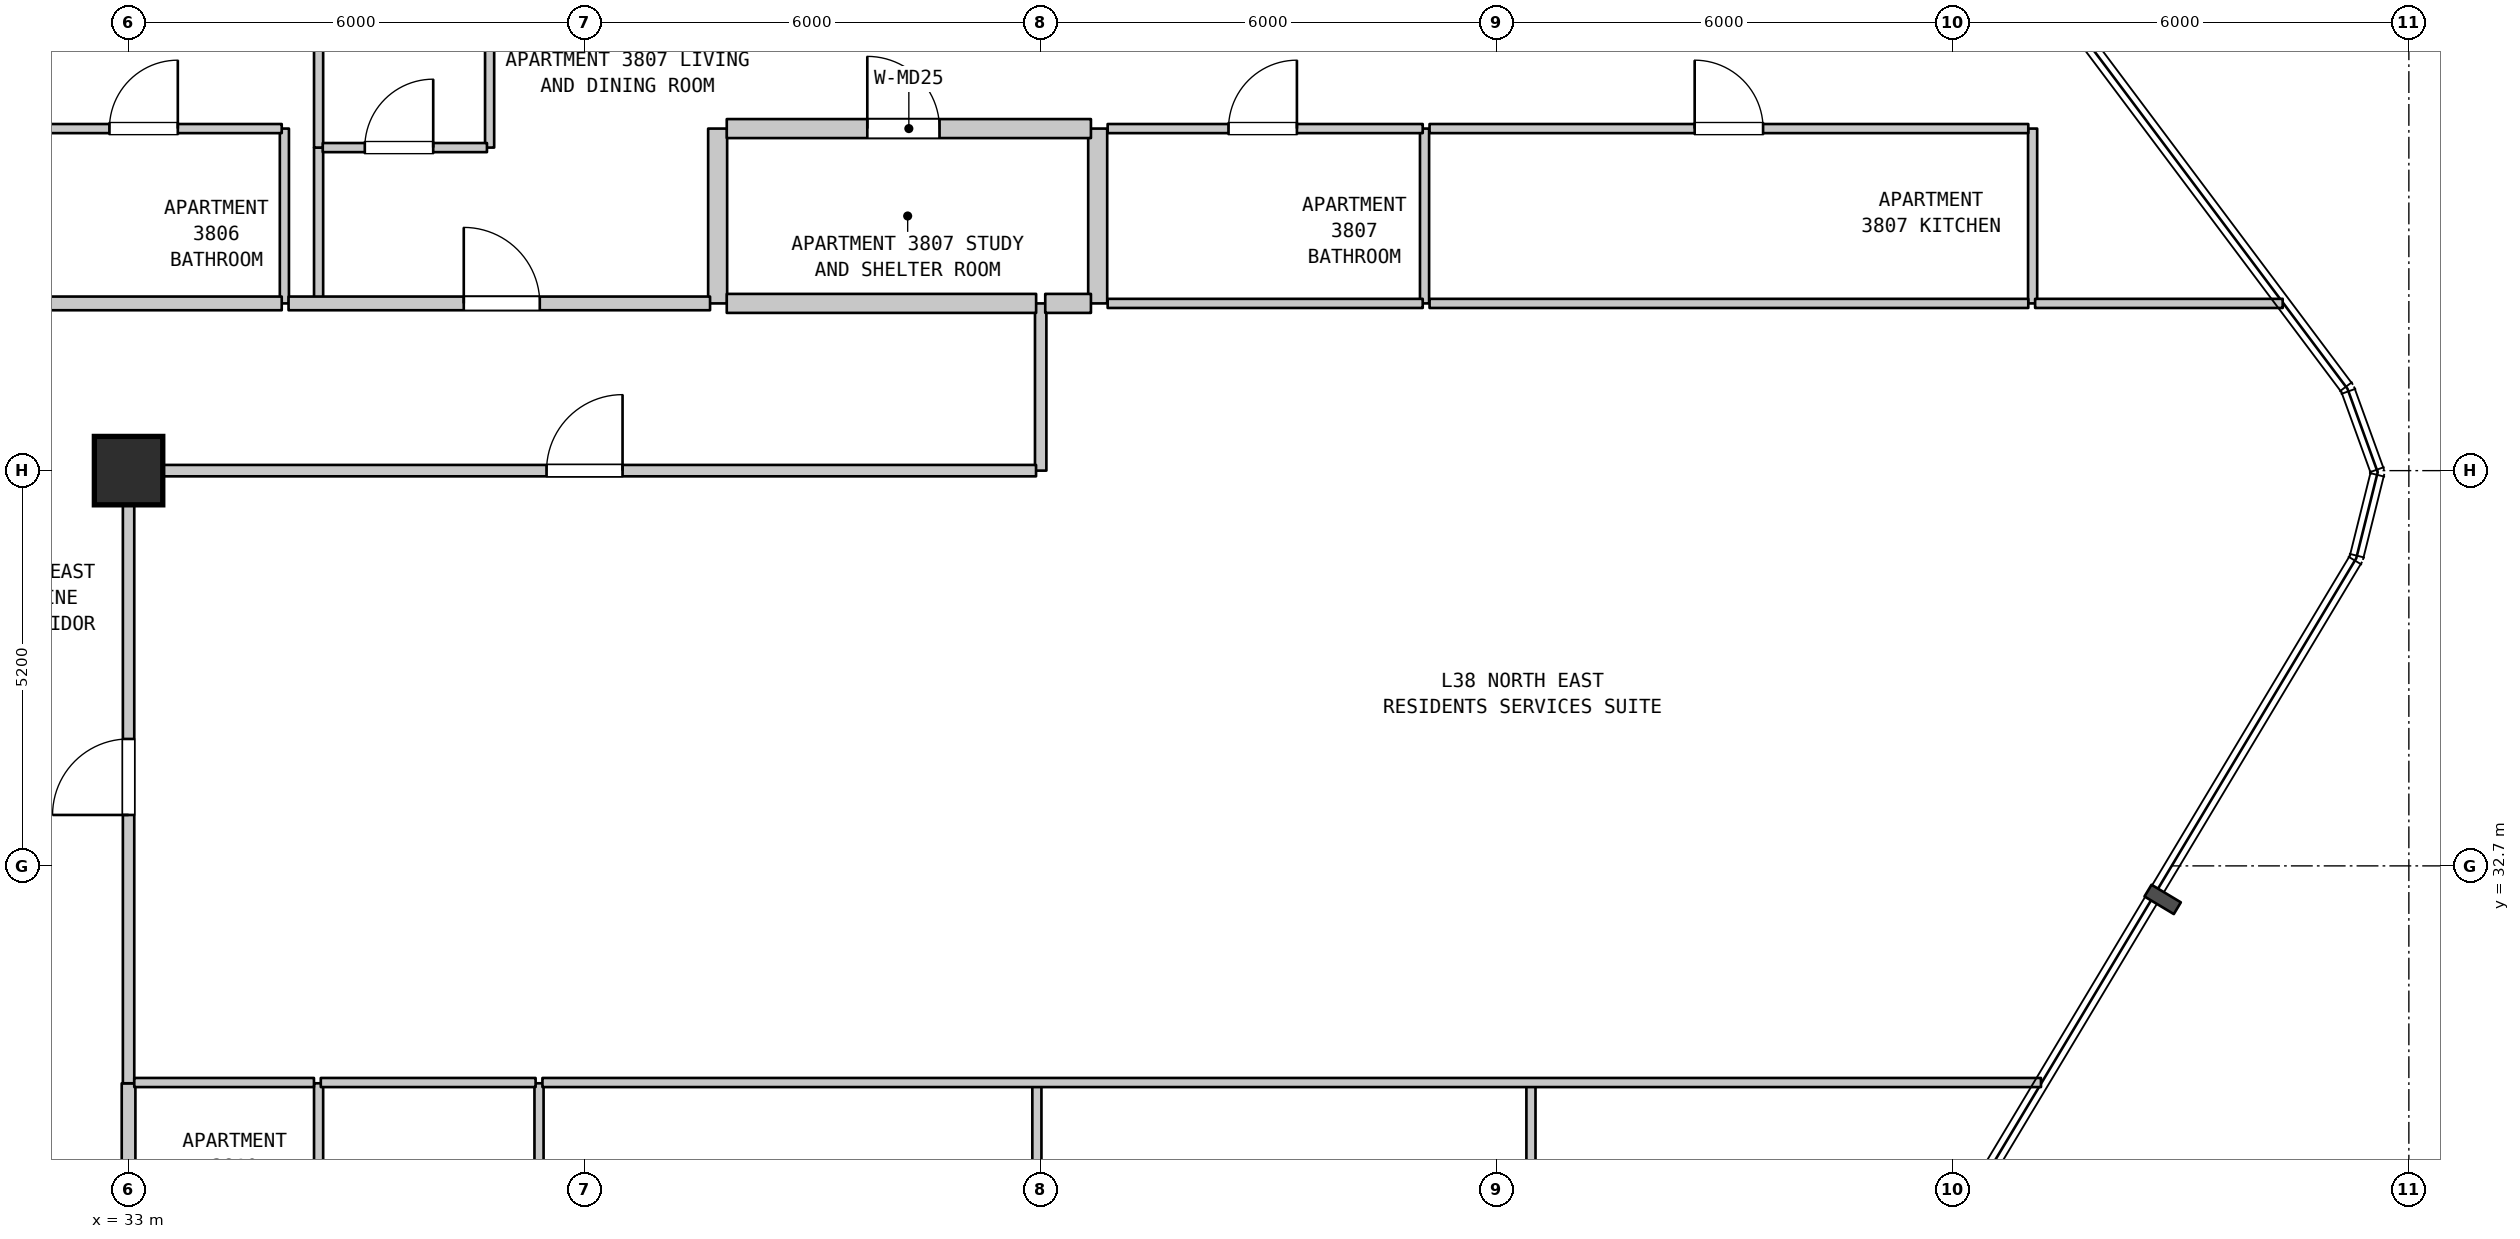
"""IFC4 building model, lengths in metres.
Left out: names, types, materials, properties, quantities, classifications, styles, units other than length and angle.
Written with IfcOpenShell. Run it as: python <this file> out.ifc"""

import sys

from ifc_helpers import new_model, si_unit, direction, frame, frame_2d, origin, origin_2d, place, context, subcontext, project, spatial, rectangle, extrude, element, fill, save


model = new_model("IFC4")
c1 = context("Model", 3, precision=1e-05, world=origin(), true_north=direction((0.0, 1.0)))
c2 = subcontext(c1, "Body", "Model", "MODEL_VIEW")
j1 = project(units=[si_unit("LENGTHUNIT", "METRE"), si_unit("PLANEANGLEUNIT", "RADIAN")], contexts=[c1])
p1 = place(None, origin())
s1 = spatial("IfcSite", under=j1, at=p1, CompositionType="ELEMENT")
p2 = place(p1, origin())
s2 = spatial("IfcBuilding", under=s1, at=p2, CompositionType="ELEMENT")
p3 = place(p2, frame((0.0, 0.0, 155.7)))
s3 = spatial("IfcBuildingStorey", under=s2, at=p3, CompositionType="ELEMENT", Elevation=155.7)
p4 = place(p3, frame((33.0, 37.9, 0.0), z_axis=(0.0, 0.0, 1.0), x_axis=(1.0, 0.0, 0.0)))
e1 = element("IfcColumn", 1, at=p4, inside=s3, PredefinedType="COLUMN", context=c2, shape_type="SweptSolid", body=[
    extrude(rectangle(XDim=0.9, YDim=0.9, at=origin_2d()), origin(), (0.0, 0.0, 1.0), 3.7),
])
p5 = place(p3, frame((33.0, 26.12, 0.0), z_axis=(0.0, 0.0, 1.0), x_axis=(0.0, 1.0, 0.0)))
e2 = element("IfcWall", 2, at=p5, inside=s3, PredefinedType="STANDARD", context=c2, shape_type="SweptSolid", body=[
    extrude(rectangle(XDim=3.72, YDim=0.18, at=frame_2d((1.86, 0.0))), origin(), (0.0, 0.0, 1.0), 2.78),
])
p6 = place(p3, frame((33.0, 29.84, 0.0), z_axis=(0.0, 0.0, 1.0), x_axis=(0.0, 1.0, 0.0)))
e3 = element("IfcWall", 3, at=p6, inside=s3, PredefinedType="STANDARD", context=c2, shape_type="SweptSolid", body=[
    extrude(rectangle(XDim=8.06, YDim=0.15, at=frame_2d((4.03, 0.0))), origin(), (0.0, 0.0, 1.0), 2.78),
])
p7 = place(p6, frame((3.53, 0.0, 0.0)))
e4 = element("IfcOpeningElement", 4, at=p7, cuts=e3, PredefinedType="OPENING", context=c2, shape_type="SweptSolid", body=[
    extrude(rectangle(XDim=1.0, YDim=2.15, at=frame_2d((0.5, 1.075))), frame((0.0, 0.085, 0.0), z_axis=(0.0, -1.0, 0.0), x_axis=(1.0, 0.0, 0.0)), (0.0, 0.0, 1.0), 0.17),
])
p8 = place(p3, frame((35.05, 40.1, 0.0), z_axis=(0.0, 0.0, 1.0), x_axis=(0.0, 1.0, 0.0)))
e5 = element("IfcWall", 5, at=p8, inside=s3, PredefinedType="PARTITIONING", context=c2, shape_type="SweptSolid", body=[
    extrude(rectangle(XDim=2.3, YDim=0.12, at=frame_2d((1.15, 0.0))), origin(), (0.0, 0.0, 1.0), 3.28),
])
p9 = place(p3, frame((35.5, 26.12, 0.0), z_axis=(0.0, 0.0, 1.0), x_axis=(0.0, 1.0, 0.0)))
e6 = element("IfcWall", 6, at=p9, inside=s3, PredefinedType="PARTITIONING", context=c2, shape_type="SweptSolid", body=[
    extrude(rectangle(XDim=3.72, YDim=0.12, at=frame_2d((1.86, 0.0))), origin(), (0.0, 0.0, 1.0), 3.28),
])
p10 = place(p3, frame((35.5, 40.1, 0.0), z_axis=(0.0, 0.0, 1.0), x_axis=(0.0, 1.0, 0.0)))
e7 = element("IfcWall", 7, at=p10, inside=s3, PredefinedType="PARTITIONING", context=c2, shape_type="SweptSolid", body=[
    extrude(rectangle(XDim=2.05, YDim=0.12, at=frame_2d((1.025, 0.0))), origin(), (0.0, 0.0, 1.0), 3.28),
])
p11 = place(p3, frame((35.5, 42.15, 0.0), z_axis=(0.0, 0.0, 1.0), x_axis=(0.0, 1.0, 0.0)))
e8 = element("IfcWall", 8, at=p11, inside=s3, PredefinedType="PARTITIONING", context=c2, shape_type="SweptSolid", body=[
    extrude(rectangle(XDim=3.3, YDim=0.12, at=frame_2d((1.65, 0.0))), origin(), (0.0, 0.0, 1.0), 3.28),
])
p12 = place(p3, frame((37.75, 42.15, 0.0), z_axis=(0.0, 0.0, 1.0), x_axis=(0.0, 1.0, 0.0)))
e9 = element("IfcWall", 9, at=p12, inside=s3, PredefinedType="PARTITIONING", context=c2, shape_type="SweptSolid", body=[
    extrude(rectangle(XDim=3.15, YDim=0.12, at=frame_2d((1.575, 0.0))), origin(), (0.0, 0.0, 1.0), 3.28),
])
p13 = place(p3, frame((38.4, 26.12, 0.0), z_axis=(0.0, 0.0, 1.0), x_axis=(0.0, 1.0, 0.0)))
e10 = element("IfcWall", 10, at=p13, inside=s3, PredefinedType="PARTITIONING", context=c2, shape_type="SweptSolid", body=[
    extrude(rectangle(XDim=3.72, YDim=0.12, at=frame_2d((1.86, 0.0))), origin(), (0.0, 0.0, 1.0), 3.28),
])
p14 = place(p3, frame((40.75, 40.1, 0.0), z_axis=(0.0, 0.0, 1.0), x_axis=(0.0, 1.0, 0.0)))
e11 = element("IfcWall", 11, at=p14, inside=s3, PredefinedType="STANDARD", context=c2, shape_type="SweptSolid", body=[
    extrude(rectangle(XDim=2.3, YDim=0.25, at=frame_2d((1.15, 0.0))), origin(), (0.0, 0.0, 1.0), 3.28),
])
p15 = place(p3, frame((44.95, 26.12, 0.0), z_axis=(0.0, 0.0, 1.0), x_axis=(0.0, 1.0, 0.0)))
e12 = element("IfcWall", 12, at=p15, inside=s3, PredefinedType="PARTITIONING", context=c2, shape_type="SweptSolid", body=[
    extrude(rectangle(XDim=3.72, YDim=0.12, at=frame_2d((1.86, 0.0))), origin(), (0.0, 0.0, 1.0), 3.28),
])
p16 = place(p3, frame((45.0, 37.9, 0.0), z_axis=(0.0, 0.0, 1.0), x_axis=(0.0, 1.0, 0.0)))
e13 = element("IfcWall", 13, at=p16, inside=s3, PredefinedType="STANDARD", context=c2, shape_type="SweptSolid", body=[
    extrude(rectangle(XDim=2.2, YDim=0.15, at=frame_2d((1.1, 0.0))), origin(), (0.0, 0.0, 1.0), 3.28),
])
p17 = place(p3, frame((45.75, 40.1, 0.0), z_axis=(0.0, 0.0, 1.0), x_axis=(0.0, 1.0, 0.0)))
e14 = element("IfcWall", 14, at=p17, inside=s3, PredefinedType="STANDARD", context=c2, shape_type="SweptSolid", body=[
    extrude(rectangle(XDim=2.3, YDim=0.25, at=frame_2d((1.15, 0.0))), origin(), (0.0, 0.0, 1.0), 3.28),
])
p18 = place(p3, frame((50.05, 40.1, 0.0), z_axis=(0.0, 0.0, 1.0), x_axis=(0.0, 1.0, 0.0)))
e15 = element("IfcWall", 15, at=p18, inside=s3, PredefinedType="PARTITIONING", context=c2, shape_type="SweptSolid", body=[
    extrude(rectangle(XDim=2.3, YDim=0.12, at=frame_2d((1.15, 0.0))), origin(), (0.0, 0.0, 1.0), 3.28),
])
p19 = place(p3, frame((51.45, 26.12, 0.0), z_axis=(0.0, 0.0, 1.0), x_axis=(0.0, 1.0, 0.0)))
e16 = element("IfcWall", 16, at=p19, inside=s3, PredefinedType="PARTITIONING", context=c2, shape_type="SweptSolid", body=[
    extrude(rectangle(XDim=3.72, YDim=0.12, at=frame_2d((1.86, 0.0))), origin(), (0.0, 0.0, 1.0), 3.28),
])
p20 = place(p3, frame((58.05, 40.1, 0.0), z_axis=(0.0, 0.0, 1.0), x_axis=(0.0, 1.0, 0.0)))
e17 = element("IfcWall", 17, at=p20, inside=s3, PredefinedType="PARTITIONING", context=c2, shape_type="SweptSolid", body=[
    extrude(rectangle(XDim=2.3, YDim=0.12, at=frame_2d((1.15, 0.0))), origin(), (0.0, 0.0, 1.0), 3.28),
])
p21 = place(p3, frame((33.075, 29.85, 0.0), z_axis=(0.0, 0.0, 1.0), x_axis=(1.0, 0.0, 0.0)))
e18 = element("IfcWall", 18, at=p21, inside=s3, PredefinedType="PARTITIONING", context=c2, shape_type="SweptSolid", body=[
    extrude(rectangle(XDim=2.364, YDim=0.12, at=frame_2d((1.182, 0.0))), origin(), (0.0, 0.0, 1.0), 3.28),
])
p22 = place(p3, frame((35.529, 29.85, 0.0), z_axis=(0.0, 0.0, 1.0), x_axis=(1.0, 0.0, 0.0)))
e19 = element("IfcWall", 19, at=p22, inside=s3, PredefinedType="PARTITIONING", context=c2, shape_type="SweptSolid", body=[
    extrude(rectangle(XDim=2.826, YDim=0.12, at=frame_2d((1.413, 0.0))), origin(), (0.0, 0.0, 1.0), 3.28),
])
p23 = place(p3, frame((38.445, 29.85, 0.0), z_axis=(0.0, 0.0, 1.0), x_axis=(1.0, 0.0, 0.0)))
e20 = element("IfcWall", 20, at=p23, inside=s3, PredefinedType="PARTITIONING", context=c2, shape_type="SweptSolid", body=[
    extrude(rectangle(XDim=19.715, YDim=0.12, at=frame_2d((9.857, 0.0))), origin(), (0.0, 0.0, 1.0), 3.28),
])
p24 = place(p3, frame((33.06, 37.9, 0.0), z_axis=(0.0, 0.0, 1.0), x_axis=(1.0, 0.0, 0.0)))
e21 = element("IfcWall", 21, at=p24, inside=s3, PredefinedType="STANDARD", context=c2, shape_type="SweptSolid", body=[
    extrude(rectangle(XDim=11.879, YDim=0.15, at=frame_2d((5.939, 0.0))), origin(), (0.0, 0.0, 1.0), 3.28),
])
p25 = place(p24, frame((5.439, 0.0, 0.0)))
e22 = element("IfcOpeningElement", 22, at=p25, cuts=e21, PredefinedType="OPENING", context=c2, shape_type="SweptSolid", body=[
    extrude(rectangle(XDim=1.0, YDim=2.15, at=frame_2d((0.5, 1.075))), frame((0.0, 0.085, 0.0), z_axis=(0.0, -1.0, 0.0), x_axis=(1.0, 0.0, 0.0)), (0.0, 0.0, 1.0), 0.17),
])
p26 = place(p3, frame((31.525, 40.1, 0.0), z_axis=(0.0, 0.0, 1.0), x_axis=(1.0, 0.0, 0.0)))
e23 = element("IfcWall", 23, at=p26, inside=s3, PredefinedType="STANDARD", context=c2, shape_type="SweptSolid", body=[
    extrude(rectangle(XDim=3.49, YDim=0.18, at=frame_2d((1.745, 0.0))), origin(), (0.0, 0.0, 1.0), 3.28),
])
p27 = place(p3, frame((35.105, 40.1, 0.0), z_axis=(0.0, 0.0, 1.0), x_axis=(1.0, 0.0, 0.0)))
e24 = element("IfcWall", 24, at=p27, inside=s3, PredefinedType="STANDARD", context=c2, shape_type="SweptSolid", body=[
    extrude(rectangle(XDim=5.545, YDim=0.18, at=frame_2d((2.772, 0.0))), origin(), (0.0, 0.0, 1.0), 3.28),
])
p28 = place(p27, frame((2.305, 0.0, 0.0)))
e25 = element("IfcOpeningElement", 25, at=p28, cuts=e24, PredefinedType="OPENING", context=c2, shape_type="SweptSolid", body=[
    extrude(rectangle(XDim=1.0, YDim=2.15, at=frame_2d((0.5, 1.075))), frame((0.0, 0.1, 0.0), z_axis=(0.0, -1.0, 0.0), x_axis=(1.0, 0.0, 0.0)), (0.0, 0.0, 1.0), 0.2),
])
p29 = place(p3, frame((40.87, 40.1, 0.0), z_axis=(0.0, 0.0, 1.0), x_axis=(1.0, 0.0, 0.0)))
e26 = element("IfcWall", 26, at=p29, inside=s3, PredefinedType="STANDARD", context=c2, shape_type="SweptSolid", body=[
    extrude(rectangle(XDim=4.07, YDim=0.25, at=frame_2d((2.035, 0.0))), origin(), (0.0, 0.0, 1.0), 3.28),
])
p30 = place(p3, frame((45.06, 40.1, 0.0), z_axis=(0.0, 0.0, 1.0), x_axis=(1.0, 0.0, 0.0)))
e27 = element("IfcWall", 27, at=p30, inside=s3, PredefinedType="STANDARD", context=c2, shape_type="SweptSolid", body=[
    extrude(rectangle(XDim=0.601, YDim=0.25, at=frame_2d((0.3, 0.0))), origin(), (0.0, 0.0, 1.0), 3.28),
])
p31 = place(p3, frame((45.881, 40.1, 0.0), z_axis=(0.0, 0.0, 1.0), x_axis=(1.0, 0.0, 0.0)))
e28 = element("IfcWall", 28, at=p31, inside=s3, PredefinedType="PARTITIONING", context=c2, shape_type="SweptSolid", body=[
    extrude(rectangle(XDim=4.145, YDim=0.12, at=frame_2d((2.072, 0.0))), origin(), (0.0, 0.0, 1.0), 3.28),
])
p32 = place(p3, frame((50.116, 40.1, 0.0), z_axis=(0.0, 0.0, 1.0), x_axis=(1.0, 0.0, 0.0)))
e29 = element("IfcWall", 29, at=p32, inside=s3, PredefinedType="PARTITIONING", context=c2, shape_type="SweptSolid", body=[
    extrude(rectangle(XDim=7.877, YDim=0.12, at=frame_2d((3.938, 0.0))), origin(), (0.0, 0.0, 1.0), 3.28),
])
p33 = place(p3, frame((58.083, 40.1, 0.0), z_axis=(0.0, 0.0, 1.0), x_axis=(1.0, 0.0, 0.0)))
e30 = element("IfcWall", 30, at=p33, inside=s3, PredefinedType="PARTITIONING", context=c2, shape_type="SweptSolid", body=[
    extrude(rectangle(XDim=3.257, YDim=0.12, at=frame_2d((1.628, 0.0))), origin(), (0.0, 0.0, 1.0), 3.28),
])
p34 = place(p3, frame((35.555, 42.15, 0.0), z_axis=(0.0, 0.0, 1.0), x_axis=(1.0, 0.0, 0.0)))
e31 = element("IfcWall", 31, at=p34, inside=s3, PredefinedType="PARTITIONING", context=c2, shape_type="SweptSolid", body=[
    extrude(rectangle(XDim=2.16, YDim=0.12, at=frame_2d((1.08, 0.0))), origin(), (0.0, 0.0, 1.0), 3.28),
])
p35 = place(p34, frame((0.553, 0.0, 0.0)))
e32 = element("IfcOpeningElement", 32, at=p35, cuts=e31, PredefinedType="OPENING", context=c2, shape_type="SweptSolid", body=[
    extrude(rectangle(XDim=0.9, YDim=2.15, at=frame_2d((0.45, 1.075))), frame((0.0, 0.07, 0.0), z_axis=(0.0, -1.0, 0.0), x_axis=(1.0, 0.0, 0.0)), (0.0, 0.0, 1.0), 0.14),
])
p36 = place(p3, frame((31.525, 42.4, 0.0), z_axis=(0.0, 0.0, 1.0), x_axis=(1.0, 0.0, 0.0)))
e33 = element("IfcWall", 33, at=p36, inside=s3, PredefinedType="PARTITIONING", context=c2, shape_type="SweptSolid", body=[
    extrude(rectangle(XDim=3.49, YDim=0.12, at=frame_2d((1.745, 0.0))), origin(), (0.0, 0.0, 1.0), 3.28),
])
p37 = place(p36, frame((1.223, 0.0, 0.0)))
e34 = element("IfcOpeningElement", 34, at=p37, cuts=e33, PredefinedType="OPENING", context=c2, shape_type="SweptSolid", body=[
    extrude(rectangle(XDim=0.9, YDim=2.1, at=frame_2d((0.45, 1.05))), frame((0.0, 0.07, 0.0), z_axis=(0.0, -1.0, 0.0), x_axis=(1.0, 0.0, 0.0)), (0.0, 0.0, 1.0), 0.14),
])
p38 = place(p3, frame((40.87, 42.4, 0.0), z_axis=(0.0, 0.0, 1.0), x_axis=(1.0, 0.0, 0.0)))
e35 = element("IfcWall", 35, at=p38, inside=s3, PredefinedType="STANDARD", context=c2, shape_type="SweptSolid", body=[
    extrude(rectangle(XDim=4.791, YDim=0.25, at=frame_2d((2.396, 0.0))), origin(), (0.0, 0.0, 1.0), 3.28),
])
p39 = place(p38, frame((1.849, 0.0, 0.0)))
e36 = element("IfcOpeningElement", 36, at=p39, cuts=e35, PredefinedType="OPENING", context=c2, shape_type="SweptSolid", body=[
    extrude(rectangle(XDim=0.95, YDim=2.15, at=frame_2d((0.475, 1.075))), frame((0.0, 0.135, 0.0), z_axis=(0.0, -1.0, 0.0), x_axis=(1.0, 0.0, 0.0)), (0.0, 0.0, 1.0), 0.27),
])
p40 = place(p3, frame((45.881, 42.4, 0.0), z_axis=(0.0, 0.0, 1.0), x_axis=(1.0, 0.0, 0.0)))
e37 = element("IfcWall", 37, at=p40, inside=s3, PredefinedType="PARTITIONING", context=c2, shape_type="SweptSolid", body=[
    extrude(rectangle(XDim=4.145, YDim=0.12, at=frame_2d((2.072, 0.0))), origin(), (0.0, 0.0, 1.0), 3.28),
])
p41 = place(p40, frame((1.59, 0.0, 0.0)))
e38 = element("IfcOpeningElement", 38, at=p41, cuts=e37, PredefinedType="OPENING", context=c2, shape_type="SweptSolid", body=[
    extrude(rectangle(XDim=0.9, YDim=2.1, at=frame_2d((0.45, 1.05))), frame((0.0, 0.07, 0.0), z_axis=(0.0, -1.0, 0.0), x_axis=(1.0, 0.0, 0.0)), (0.0, 0.0, 1.0), 0.14),
])
p42 = place(p3, frame((50.116, 42.4, 0.0), z_axis=(0.0, 0.0, 1.0), x_axis=(1.0, 0.0, 0.0)))
e39 = element("IfcWall", 39, at=p42, inside=s3, PredefinedType="PARTITIONING", context=c2, shape_type="SweptSolid", body=[
    extrude(rectangle(XDim=7.877, YDim=0.12, at=frame_2d((3.938, 0.0))), origin(), (0.0, 0.0, 1.0), 3.28),
])
p43 = place(p42, frame((3.488, 0.0, 0.0)))
e40 = element("IfcOpeningElement", 40, at=p43, cuts=e39, PredefinedType="OPENING", context=c2, shape_type="SweptSolid", body=[
    extrude(rectangle(XDim=0.9, YDim=2.15, at=frame_2d((0.45, 1.075))), frame((0.0, 0.07, 0.0), z_axis=(0.0, -1.0, 0.0), x_axis=(1.0, 0.0, 0.0)), (0.0, 0.0, 1.0), 0.14),
])
p44 = place(p7, origin())
e41 = element("IfcDoor", 41, at=p44, inside=s3, OperationType="SINGLE_SWING_LEFT", PredefinedType="DOOR", context=c2, shape_type="SweptSolid", body=[
    extrude(rectangle(XDim=1.0, YDim=2.15, at=frame_2d((0.5, 1.075))), frame((0.0, 0.025, 0.0), z_axis=(0.0, -1.0, 0.0), x_axis=(1.0, 0.0, 0.0)), (0.0, 0.0, 1.0), 0.05),
])
fill(e4, e41)
p45 = place(p25, origin())
e42 = element("IfcDoor", 42, at=p45, inside=s3, OperationType="SINGLE_SWING_RIGHT", PredefinedType="DOOR", context=c2, shape_type="SweptSolid", body=[
    extrude(rectangle(XDim=1.0, YDim=2.15, at=frame_2d((0.5, 1.075))), frame((0.0, 0.025, 0.0), z_axis=(0.0, -1.0, 0.0), x_axis=(1.0, 0.0, 0.0)), (0.0, 0.0, 1.0), 0.05),
])
fill(e22, e42)
p46 = place(p28, origin())
e43 = element("IfcDoor", 43, at=p46, inside=s3, OperationType="SINGLE_SWING_LEFT", PredefinedType="DOOR", context=c2, shape_type="SweptSolid", body=[
    extrude(rectangle(XDim=1.0, YDim=2.15, at=frame_2d((0.5, 1.075))), frame((0.0, 0.025, 0.0), z_axis=(0.0, -1.0, 0.0), x_axis=(1.0, 0.0, 0.0)), (0.0, 0.0, 1.0), 0.05),
])
fill(e25, e43)
p47 = place(p35, origin())
e44 = element("IfcDoor", 44, at=p47, inside=s3, OperationType="SINGLE_SWING_RIGHT", PredefinedType="DOOR", context=c2, shape_type="SweptSolid", body=[
    extrude(rectangle(XDim=0.9, YDim=2.15, at=frame_2d((0.45, 1.075))), frame((0.0, 0.025, 0.0), z_axis=(0.0, -1.0, 0.0), x_axis=(1.0, 0.0, 0.0)), (0.0, 0.0, 1.0), 0.05),
])
fill(e32, e44)
p48 = place(p37, origin())
e45 = element("IfcDoor", 45, at=p48, inside=s3, OperationType="SINGLE_SWING_RIGHT", PredefinedType="DOOR", context=c2, shape_type="SweptSolid", body=[
    extrude(rectangle(XDim=0.9, YDim=2.1, at=frame_2d((0.45, 1.05))), frame((0.0, 0.025, 0.0), z_axis=(0.0, -1.0, 0.0), x_axis=(1.0, 0.0, 0.0)), (0.0, 0.0, 1.0), 0.05),
])
fill(e34, e45)
p49 = place(p39, origin())
e46 = element("IfcDoor", 46, at=p49, inside=s3, OperationType="SINGLE_SWING_LEFT", PredefinedType="DOOR", context=c2, shape_type="SweptSolid", body=[
    extrude(rectangle(XDim=0.95, YDim=2.15, at=frame_2d((0.475, 1.075))), frame((0.0, 0.025, 0.0), z_axis=(0.0, -1.0, 0.0), x_axis=(1.0, 0.0, 0.0)), (0.0, 0.0, 1.0), 0.05),
])
fill(e36, e46)
p50 = place(p41, origin())
e47 = element("IfcDoor", 47, at=p50, inside=s3, OperationType="SINGLE_SWING_RIGHT", PredefinedType="DOOR", context=c2, shape_type="SweptSolid", body=[
    extrude(rectangle(XDim=0.9, YDim=2.1, at=frame_2d((0.45, 1.05))), frame((0.0, 0.025, 0.0), z_axis=(0.0, -1.0, 0.0), x_axis=(1.0, 0.0, 0.0)), (0.0, 0.0, 1.0), 0.05),
])
fill(e38, e47)
p51 = place(p43, origin())
e48 = element("IfcDoor", 48, at=p51, inside=s3, OperationType="SINGLE_SWING_LEFT", PredefinedType="DOOR", context=c2, shape_type="SweptSolid", body=[
    extrude(rectangle(XDim=0.9, YDim=2.15, at=frame_2d((0.45, 1.075))), frame((0.0, 0.025, 0.0), z_axis=(0.0, -1.0, 0.0), x_axis=(1.0, 0.0, 0.0)), (0.0, 0.0, 1.0), 0.05),
])
fill(e40, e48)
save(model, sys.argv[1])
